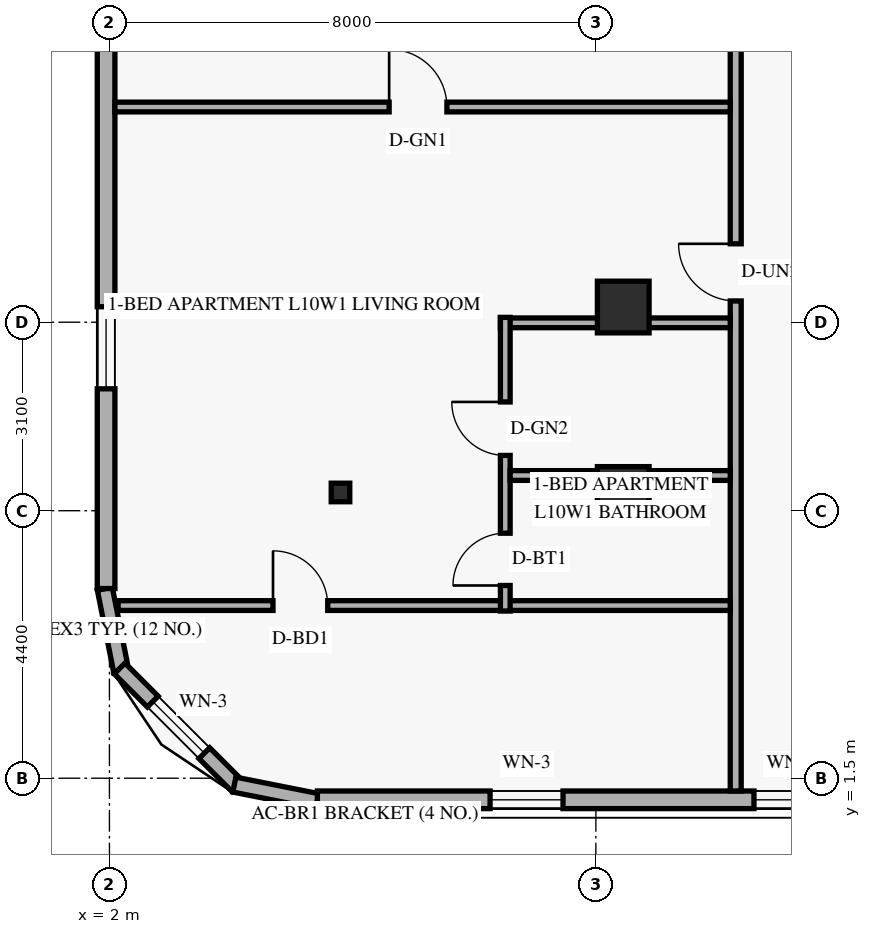
"""IFC4 building model, lengths in metres.
Left out: names, types, materials, properties, quantities, classifications, styles, units other than length and angle.
Written with IfcOpenShell. Run it as: python <this file> out.ifc"""

import sys

from ifc_helpers import new_model, si_unit, direction, frame, frame_2d, origin, origin_2d, place, context, subcontext, project, spatial, rectangle, hollow_rectangle, extrude, element, fill, save


model = new_model("IFC4")
c1 = context("Model", 3, precision=1e-05, world=origin(), true_north=direction((0.0, 1.0)))
c2 = subcontext(c1, "Body", "Model", "MODEL_VIEW")
j1 = project(units=[si_unit("LENGTHUNIT", "METRE"), si_unit("PLANEANGLEUNIT", "RADIAN")], contexts=[c1])
p1 = place(None, origin())
s1 = spatial("IfcSite", under=j1, at=p1, CompositionType="ELEMENT")
p2 = place(p1, origin())
s2 = spatial("IfcBuilding", under=s1, at=p2, CompositionType="ELEMENT")
p3 = place(p2, frame((0.0, 0.0, 42.0)))
s3 = spatial("IfcBuildingStorey", under=s2, at=p3, CompositionType="ELEMENT", Elevation=42.0)
for number, where, z_axis, x_axis in (
    (1, (5.8, 6.2, 0.0), (0.0, 0.0, 1.0), (1.0, 0.0, 0.0)),
    (2, (5.8, 9.25, 0.0), (0.0, 0.0, 1.0), (1.0, 0.0, 0.0)),
):
    element("IfcColumn", number, at=place(p3, frame(where, z_axis=z_axis, x_axis=x_axis)), inside=s3, PredefinedType="COLUMN", context=c2, shape_type="SweptSolid", body=[
        extrude(hollow_rectangle(XDim=0.305, YDim=0.305, WallThickness=0.013, at=origin_2d()), origin(), (0.0, 0.0, 1.0), 3.6),
    ])
for number, where, z_axis, x_axis in (
    (3, (10.45, 6.2, 0.0), (0.0, 0.0, 1.0), (1.0, 0.0, 0.0)),
    (4, (10.45, 9.25, 0.0), (0.0, 0.0, 1.0), (1.0, 0.0, 0.0)),
):
    element("IfcColumn", number, at=place(p3, frame(where, z_axis=z_axis, x_axis=x_axis)), inside=s3, PredefinedType="COLUMN", context=c2, shape_type="SweptSolid", body=[
        extrude(rectangle(XDim=0.85, YDim=0.85, at=origin_2d()), origin(), (0.0, 0.0, 1.0), 3.6),
    ])
p4 = place(p3, frame((1.924, 4.616, 0.0), z_axis=(0.0, 0.0, 1.0), x_axis=(0.19496651342, -0.980809899341, 0.0)))
e5 = element("IfcWall", 5, at=p4, inside=s3, PredefinedType="SOLIDWALL", context=c2, shape_type="SweptSolid", body=[
    extrude(rectangle(XDim=1.389, YDim=0.25, at=frame_2d((0.694, 0.0))), origin(), (0.0, 0.0, 1.0), 3.36),
])
p5 = place(p3, frame((2.168, 3.305, 0.0), z_axis=(0.0, 0.0, 1.0), x_axis=(0.707106781187, -0.707106781187, 0.0)))
e6 = element("IfcWall", 6, at=p5, inside=s3, PredefinedType="SOLIDWALL", context=c2, shape_type="SweptSolid", body=[
    extrude(rectangle(XDim=2.739, YDim=0.25, at=frame_2d((1.37, 0.0))), origin(), (0.0, 0.0, 1.0), 3.36),
])
p6 = place(p5, frame((0.77, 0.0, 0.85)))
e7 = element("IfcOpeningElement", 7, at=p6, cuts=e6, PredefinedType="OPENING", context=c2, shape_type="SweptSolid", body=[
    extrude(rectangle(XDim=1.2, YDim=1.5, at=frame_2d((0.6, 0.75))), frame((0.0, 0.135, 0.0), z_axis=(0.0, -1.0, 0.0), x_axis=(1.0, 0.0, 0.0)), (0.0, 0.0, 1.0), 0.27),
])
p7 = place(p3, frame((4.054, 1.395, 0.0), z_axis=(0.0, 0.0, 1.0), x_axis=(0.980809899341, -0.19496651342, 0.0)))
e8 = element("IfcWall", 8, at=p7, inside=s3, PredefinedType="SOLIDWALL", context=c2, shape_type="SweptSolid", body=[
    extrude(rectangle(XDim=1.389, YDim=0.25, at=frame_2d((0.694, 0.0))), origin(), (0.0, 0.0, 1.0), 3.36),
])
p8 = place(p3, frame((5.42, 1.145, 0.0), z_axis=(0.0, 0.0, 1.0), x_axis=(1.0, 0.0, 0.0)))
e9 = element("IfcWall", 9, at=p8, inside=s3, PredefinedType="SOLIDWALL", context=c2, shape_type="SweptSolid", body=[
    extrude(rectangle(XDim=39.56, YDim=0.29, at=frame_2d((19.78, 0.0))), origin(), (0.0, 0.0, 1.0), 3.36),
])
p9 = place(p8, frame((2.84, 0.0, 0.85)))
e10 = element("IfcOpeningElement", 10, at=p9, cuts=e9, PredefinedType="OPENING", context=c2, shape_type="SweptSolid", body=[
    extrude(rectangle(XDim=1.2, YDim=1.5, at=frame_2d((0.6, 0.75))), frame((0.0, 0.155, 0.0), z_axis=(0.0, -1.0, 0.0), x_axis=(1.0, 0.0, 0.0)), (0.0, 0.0, 1.0), 0.31),
])
p10 = place(p8, frame((7.18, 0.0, 0.85)))
e11 = element("IfcOpeningElement", 11, at=p10, cuts=e9, PredefinedType="OPENING", context=c2, shape_type="SweptSolid", body=[
    extrude(rectangle(XDim=1.2, YDim=1.5, at=frame_2d((0.6, 0.75))), frame((0.0, 0.155, 0.0), z_axis=(0.0, -1.0, 0.0), x_axis=(1.0, 0.0, 0.0)), (0.0, 0.0, 1.0), 0.31),
])
p11 = place(p8, frame((12.131, 0.0, 0.85)))
e12 = element("IfcOpeningElement", 12, at=p11, cuts=e9, PredefinedType="OPENING", context=c2, shape_type="SweptSolid", body=[
    extrude(rectangle(XDim=1.2, YDim=1.5, at=frame_2d((0.6, 0.75))), frame((0.0, 0.155, 0.0), z_axis=(0.0, -1.0, 0.0), x_axis=(1.0, 0.0, 0.0)), (0.0, 0.0, 1.0), 0.31),
])
p12 = place(p8, frame((18.74, 0.0, 0.85)))
e13 = element("IfcOpeningElement", 13, at=p12, cuts=e9, PredefinedType="OPENING", context=c2, shape_type="SweptSolid", body=[
    extrude(rectangle(XDim=1.2, YDim=1.5, at=frame_2d((0.6, 0.75))), frame((0.0, 0.155, 0.0), z_axis=(0.0, -1.0, 0.0), x_axis=(1.0, 0.0, 0.0)), (0.0, 0.0, 1.0), 0.31),
])
p13 = place(p8, frame((25.349, 0.0, 0.85)))
e14 = element("IfcOpeningElement", 14, at=p13, cuts=e9, PredefinedType="OPENING", context=c2, shape_type="SweptSolid", body=[
    extrude(rectangle(XDim=1.2, YDim=1.5, at=frame_2d((0.6, 0.75))), frame((0.0, 0.155, 0.0), z_axis=(0.0, -1.0, 0.0), x_axis=(1.0, 0.0, 0.0)), (0.0, 0.0, 1.0), 0.31),
])
p14 = place(p8, frame((30.465, 0.0, 0.85)))
e15 = element("IfcOpeningElement", 15, at=p14, cuts=e9, PredefinedType="OPENING", context=c2, shape_type="SweptSolid", body=[
    extrude(rectangle(XDim=1.2, YDim=1.5, at=frame_2d((0.6, 0.75))), frame((0.0, 0.155, 0.0), z_axis=(0.0, -1.0, 0.0), x_axis=(1.0, 0.0, 0.0)), (0.0, 0.0, 1.0), 0.31),
])
p15 = place(p8, frame((32.838, 0.0, 0.85)))
e16 = element("IfcOpeningElement", 16, at=p15, cuts=e9, PredefinedType="OPENING", context=c2, shape_type="SweptSolid", body=[
    extrude(rectangle(XDim=1.2, YDim=1.5, at=frame_2d((0.6, 0.75))), frame((0.0, 0.155, 0.0), z_axis=(0.0, -1.0, 0.0), x_axis=(1.0, 0.0, 0.0)), (0.0, 0.0, 1.0), 0.31),
])
p16 = place(p8, frame((36.553, 0.0, 0.85)))
e17 = element("IfcOpeningElement", 17, at=p16, cuts=e9, PredefinedType="OPENING", context=c2, shape_type="SweptSolid", body=[
    extrude(rectangle(XDim=1.2, YDim=1.5, at=frame_2d((0.6, 0.75))), frame((0.0, 0.155, 0.0), z_axis=(0.0, -1.0, 0.0), x_axis=(1.0, 0.0, 0.0)), (0.0, 0.0, 1.0), 0.31),
])
p17 = place(p3, frame((1.945, 43.38, 0.0), z_axis=(0.0, 0.0, 1.0), x_axis=(0.0, -1.0, 0.0)))
e18 = element("IfcWall", 18, at=p17, inside=s3, PredefinedType="SOLIDWALL", context=c2, shape_type="SweptSolid", body=[
    extrude(rectangle(XDim=38.76, YDim=0.29, at=frame_2d((19.38, 0.0))), origin(), (0.0, 0.0, 1.0), 3.36),
])
p18 = place(p17, frame((34.125, 0.0, 0.85)))
e19 = element("IfcOpeningElement", 19, at=p18, cuts=e18, PredefinedType="OPENING", context=c2, shape_type="SweptSolid", body=[
    extrude(rectangle(XDim=1.35, YDim=1.55, at=frame_2d((0.675, 0.775))), frame((0.0, 0.155, 0.0), z_axis=(0.0, -1.0, 0.0), x_axis=(1.0, 0.0, 0.0)), (0.0, 0.0, 1.0), 0.31),
])
p19 = place(p17, frame((28.115, 0.0, 0.85)))
e20 = element("IfcOpeningElement", 20, at=p19, cuts=e18, PredefinedType="OPENING", context=c2, shape_type="SweptSolid", body=[
    extrude(rectangle(XDim=1.35, YDim=1.55, at=frame_2d((0.675, 0.775))), frame((0.0, 0.155, 0.0), z_axis=(0.0, -1.0, 0.0), x_axis=(1.0, 0.0, 0.0)), (0.0, 0.0, 1.0), 0.31),
])
p20 = place(p17, frame((24.084, 0.0, 0.85)))
e21 = element("IfcOpeningElement", 21, at=p20, cuts=e18, PredefinedType="OPENING", context=c2, shape_type="SweptSolid", body=[
    extrude(rectangle(XDim=1.35, YDim=1.55, at=frame_2d((0.675, 0.775))), frame((0.0, 0.155, 0.0), z_axis=(0.0, -1.0, 0.0), x_axis=(1.0, 0.0, 0.0)), (0.0, 0.0, 1.0), 0.31),
])
p21 = place(p17, frame((18.259, 0.0, 0.85)))
e22 = element("IfcOpeningElement", 22, at=p21, cuts=e18, PredefinedType="OPENING", context=c2, shape_type="SweptSolid", body=[
    extrude(rectangle(XDim=1.35, YDim=1.55, at=frame_2d((0.675, 0.775))), frame((0.0, 0.155, 0.0), z_axis=(0.0, -1.0, 0.0), x_axis=(1.0, 0.0, 0.0)), (0.0, 0.0, 1.0), 0.31),
])
p22 = place(p17, frame((12.42, 0.0, 0.85)))
e23 = element("IfcOpeningElement", 23, at=p22, cuts=e18, PredefinedType="OPENING", context=c2, shape_type="SweptSolid", body=[
    extrude(rectangle(XDim=1.35, YDim=1.55, at=frame_2d((0.675, 0.775))), frame((0.0, 0.155, 0.0), z_axis=(0.0, -1.0, 0.0), x_axis=(1.0, 0.0, 0.0)), (0.0, 0.0, 1.0), 0.31),
])
p23 = place(p17, frame((7.48, 0.0, 0.85)))
e24 = element("IfcOpeningElement", 24, at=p23, cuts=e18, PredefinedType="OPENING", context=c2, shape_type="SweptSolid", body=[
    extrude(rectangle(XDim=1.35, YDim=1.55, at=frame_2d((0.675, 0.775))), frame((0.0, 0.155, 0.0), z_axis=(0.0, -1.0, 0.0), x_axis=(1.0, 0.0, 0.0)), (0.0, 0.0, 1.0), 0.31),
])
p24 = place(p17, frame((1.93, 0.0, 0.85)))
e25 = element("IfcOpeningElement", 25, at=p24, cuts=e18, PredefinedType="OPENING", context=c2, shape_type="SweptSolid", body=[
    extrude(rectangle(XDim=1.35, YDim=1.55, at=frame_2d((0.675, 0.775))), frame((0.0, 0.155, 0.0), z_axis=(0.0, -1.0, 0.0), x_axis=(1.0, 0.0, 0.0)), (0.0, 0.0, 1.0), 0.31),
])
p25 = place(p3, frame((12.3, 1.29, 0.0), z_axis=(0.0, 0.0, 1.0), x_axis=(0.0, 1.0, 0.0)))
e26 = element("IfcWall", 26, at=p25, inside=s3, PredefinedType="STANDARD", context=c2, shape_type="SweptSolid", body=[
    extrude(rectangle(XDim=45.42, YDim=0.18, at=frame_2d((22.71, 0.0))), origin(), (0.0, 0.0, 1.0), 2.649),
])
p26 = place(p25, frame((8.06, 0.0, 0.0)))
e27 = element("IfcOpeningElement", 27, at=p26, cuts=e26, PredefinedType="OPENING", context=c2, shape_type="SweptSolid", body=[
    extrude(rectangle(XDim=0.94, YDim=2.15, at=frame_2d((0.47, 1.075))), frame((0.0, 0.1, 0.0), z_axis=(0.0, -1.0, 0.0), x_axis=(1.0, 0.0, 0.0)), (0.0, 0.0, 1.0), 0.2),
])
p27 = place(p25, frame((21.021, 0.0, 0.0)))
e28 = element("IfcOpeningElement", 28, at=p27, cuts=e26, PredefinedType="OPENING", context=c2, shape_type="SweptSolid", body=[
    extrude(rectangle(XDim=0.94, YDim=2.15, at=frame_2d((0.47, 1.075))), frame((0.0, 0.1, 0.0), z_axis=(0.0, -1.0, 0.0), x_axis=(1.0, 0.0, 0.0)), (0.0, 0.0, 1.0), 0.2),
])
p28 = place(p25, frame((35.99, 0.0, 0.0)))
e29 = element("IfcOpeningElement", 29, at=p28, cuts=e26, PredefinedType="OPENING", context=c2, shape_type="SweptSolid", body=[
    extrude(rectangle(XDim=0.94, YDim=2.15, at=frame_2d((0.47, 1.075))), frame((0.0, 0.1, 0.0), z_axis=(0.0, -1.0, 0.0), x_axis=(1.0, 0.0, 0.0)), (0.0, 0.0, 1.0), 0.2),
])
p29 = place(p3, frame((2.142, 4.34, 0.0), z_axis=(0.0, 0.0, 1.0), x_axis=(1.0, 0.0, 0.0)))
e30 = element("IfcWall", 30, at=p29, inside=s3, PredefinedType="PARTITIONING", context=c2, shape_type="SweptSolid", body=[
    extrude(rectangle(XDim=10.068, YDim=0.16, at=frame_2d((5.034, 0.0))), origin(), (0.0, 0.0, 1.0), 3.36),
])
p30 = place(p29, frame((2.548, 0.0, 0.0)))
e31 = element("IfcOpeningElement", 31, at=p30, cuts=e30, PredefinedType="OPENING", context=c2, shape_type="SweptSolid", body=[
    extrude(rectangle(XDim=0.9, YDim=2.14, at=frame_2d((0.45, 1.07))), frame((0.0, 0.09, 0.0), z_axis=(0.0, -1.0, 0.0), x_axis=(1.0, 0.0, 0.0)), (0.0, 0.0, 1.0), 0.18),
])
p31 = place(p3, frame((8.43, 8.99, 0.0), z_axis=(0.0, 0.0, 1.0), x_axis=(1.0, 0.0, 0.0)))
e32 = element("IfcWall", 32, at=p31, inside=s3, PredefinedType="PLUMBINGWALL", context=c2, shape_type="SweptSolid", body=[
    extrude(rectangle(XDim=3.78, YDim=0.16, at=frame_2d((1.89, 0.0))), origin(), (0.0, 0.0, 1.0), 3.36),
])
p32 = place(p3, frame((8.51, 4.25, 0.0), z_axis=(0.0, 0.0, 1.0), x_axis=(0.0, 1.0, 0.0)))
e33 = element("IfcWall", 33, at=p32, inside=s3, PredefinedType="PLUMBINGWALL", context=c2, shape_type="SweptSolid", body=[
    extrude(rectangle(XDim=4.83, YDim=0.16, at=frame_2d((2.415, 0.0))), origin(), (0.0, 0.0, 1.0), 2.809),
])
p33 = place(p32, frame((0.42, 0.0, 0.0)))
e34 = element("IfcOpeningElement", 34, at=p33, cuts=e33, PredefinedType="OPENING", context=c2, shape_type="SweptSolid", body=[
    extrude(rectangle(XDim=0.86, YDim=2.12, at=frame_2d((0.43, 1.06))), frame((0.0, 0.09, 0.0), z_axis=(0.0, -1.0, 0.0), x_axis=(1.0, 0.0, 0.0)), (0.0, 0.0, 1.0), 0.18),
])
p34 = place(p32, frame((2.559, 0.0, 0.0)))
e35 = element("IfcOpeningElement", 35, at=p34, cuts=e33, PredefinedType="OPENING", context=c2, shape_type="SweptSolid", body=[
    extrude(rectangle(XDim=0.88, YDim=2.12, at=frame_2d((0.44, 1.06))), frame((0.0, 0.09, 0.0), z_axis=(0.0, -1.0, 0.0), x_axis=(1.0, 0.0, 0.0)), (0.0, 0.0, 1.0), 0.18),
])
p35 = place(p3, frame((8.59, 6.479, 0.0), z_axis=(0.0, 0.0, 1.0), x_axis=(1.0, 0.0, 0.0)))
e36 = element("IfcWall", 36, at=p35, inside=s3, PredefinedType="PLUMBINGWALL", context=c2, shape_type="SweptSolid", body=[
    extrude(rectangle(XDim=3.62, YDim=0.16, at=frame_2d((1.81, 0.0))), origin(), (0.0, 0.0, 1.0), 3.36),
])
p36 = place(p3, frame((2.09, 12.54, 0.0), z_axis=(0.0, 0.0, 1.0), x_axis=(1.0, 0.0, 0.0)))
e37 = element("IfcWall", 37, at=p36, inside=s3, PredefinedType="PARTITIONING", context=c2, shape_type="SweptSolid", body=[
    extrude(rectangle(XDim=10.12, YDim=0.16, at=frame_2d((5.06, 0.0))), origin(), (0.0, 0.0, 1.0), 2.649),
])
p37 = place(p36, frame((4.51, 0.0, 0.0)))
e38 = element("IfcOpeningElement", 38, at=p37, cuts=e37, PredefinedType="OPENING", context=c2, shape_type="SweptSolid", body=[
    extrude(rectangle(XDim=0.95, YDim=2.15, at=frame_2d((0.475, 1.075))), frame((0.0, 0.09, 0.0), z_axis=(0.0, -1.0, 0.0), x_axis=(1.0, 0.0, 0.0)), (0.0, 0.0, 1.0), 0.18),
])
p38 = place(p6, origin())
e39 = element("IfcWindow", 39, at=p38, inside=s3, PartitioningType="SINGLE_PANEL", PredefinedType="WINDOW", context=c2, shape_type="SweptSolid", body=[
    extrude(rectangle(XDim=1.2, YDim=1.5, at=frame_2d((0.6, 0.75))), frame((0.0, 0.03, 0.0), z_axis=(0.0, -1.0, 0.0), x_axis=(1.0, 0.0, 0.0)), (0.0, 0.0, 1.0), 0.06),
])
fill(e7, e39)
p39 = place(p9, origin())
e40 = element("IfcWindow", 40, at=p39, inside=s3, PartitioningType="SINGLE_PANEL", PredefinedType="WINDOW", context=c2, shape_type="SweptSolid", body=[
    extrude(rectangle(XDim=1.2, YDim=1.5, at=frame_2d((0.6, 0.75))), frame((0.0, 0.03, 0.0), z_axis=(0.0, -1.0, 0.0), x_axis=(1.0, 0.0, 0.0)), (0.0, 0.0, 1.0), 0.06),
])
fill(e10, e40)
p40 = place(p10, origin())
e41 = element("IfcWindow", 41, at=p40, inside=s3, PartitioningType="SINGLE_PANEL", PredefinedType="WINDOW", context=c2, shape_type="SweptSolid", body=[
    extrude(rectangle(XDim=1.2, YDim=1.5, at=frame_2d((0.6, 0.75))), frame((0.0, 0.03, 0.0), z_axis=(0.0, -1.0, 0.0), x_axis=(1.0, 0.0, 0.0)), (0.0, 0.0, 1.0), 0.06),
])
fill(e11, e41)
p41 = place(p18, origin())
e42 = element("IfcWindow", 42, at=p41, inside=s3, PartitioningType="SINGLE_PANEL", PredefinedType="WINDOW", context=c2, shape_type="SweptSolid", body=[
    extrude(rectangle(XDim=1.35, YDim=1.55, at=frame_2d((0.675, 0.775))), frame((0.0, 0.03, 0.0), z_axis=(0.0, -1.0, 0.0), x_axis=(1.0, 0.0, 0.0)), (0.0, 0.0, 1.0), 0.06),
])
fill(e19, e42)
p42 = place(p37, origin())
e43 = element("IfcDoor", 43, at=p42, inside=s3, OperationType="SINGLE_SWING_LEFT", PredefinedType="DOOR", context=c2, shape_type="SweptSolid", body=[
    extrude(rectangle(XDim=0.95, YDim=2.15, at=frame_2d((0.475, 1.075))), frame((0.0, 0.025, 0.0), z_axis=(0.0, -1.0, 0.0), x_axis=(1.0, 0.0, 0.0)), (0.0, 0.0, 1.0), 0.05),
])
fill(e38, e43)
p43 = place(p26, origin())
e44 = element("IfcDoor", 44, at=p43, inside=s3, OperationType="SINGLE_SWING_RIGHT", PredefinedType="DOOR", context=c2, shape_type="SweptSolid", body=[
    extrude(rectangle(XDim=0.94, YDim=2.15, at=frame_2d((0.47, 1.075))), frame((0.0, 0.025, 0.0), z_axis=(0.0, -1.0, 0.0), x_axis=(1.0, 0.0, 0.0)), (0.0, 0.0, 1.0), 0.05),
])
fill(e27, e44)
p44 = place(p33, origin())
e45 = element("IfcDoor", 45, at=p44, inside=s3, OperationType="SINGLE_SWING_LEFT", PredefinedType="DOOR", context=c2, shape_type="SweptSolid", body=[
    extrude(rectangle(XDim=0.86, YDim=2.12, at=frame_2d((0.43, 1.06))), frame((0.0, 0.025, 0.0), z_axis=(0.0, -1.0, 0.0), x_axis=(1.0, 0.0, 0.0)), (0.0, 0.0, 1.0), 0.05),
])
fill(e34, e45)
p45 = place(p34, origin())
e46 = element("IfcDoor", 46, at=p45, inside=s3, OperationType="SINGLE_SWING_RIGHT", PredefinedType="DOOR", context=c2, shape_type="SweptSolid", body=[
    extrude(rectangle(XDim=0.88, YDim=2.12, at=frame_2d((0.44, 1.06))), frame((0.0, 0.025, 0.0), z_axis=(0.0, -1.0, 0.0), x_axis=(1.0, 0.0, 0.0)), (0.0, 0.0, 1.0), 0.05),
])
fill(e35, e46)
p46 = place(p30, origin())
e47 = element("IfcDoor", 47, at=p46, inside=s3, OperationType="SINGLE_SWING_LEFT", PredefinedType="DOOR", context=c2, shape_type="SweptSolid", body=[
    extrude(rectangle(XDim=0.9, YDim=2.14, at=frame_2d((0.45, 1.07))), frame((0.0, 0.025, 0.0), z_axis=(0.0, -1.0, 0.0), x_axis=(1.0, 0.0, 0.0)), (0.0, 0.0, 1.0), 0.05),
])
fill(e31, e47)
save(model, sys.argv[1])
